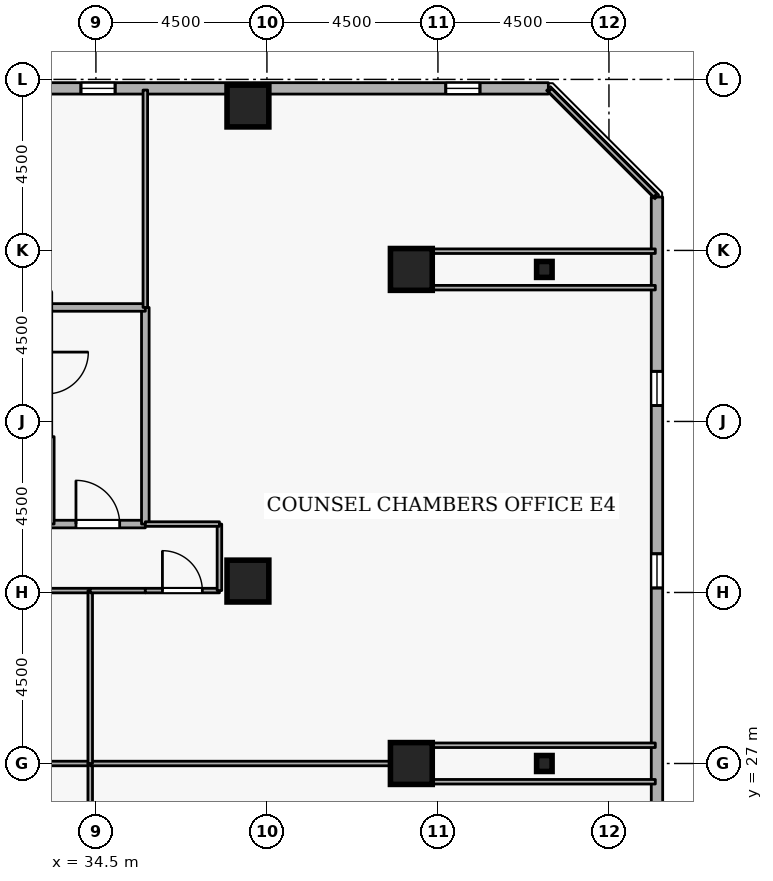
"""IFC4 building model, lengths in metres.
Left out: names, types, materials, properties, quantities, classifications, styles, units other than length and angle.
Written with IfcOpenShell. Run it as: python <this file> out.ifc"""

import sys

from ifc_helpers import new_model, si_unit, direction, frame, frame_2d, origin, origin_2d, place, context, subcontext, project, spatial, rectangle, i_section, extrude, element, fill, save


model = new_model("IFC4")
c1 = context("Model", 3, precision=1e-05, world=origin(), true_north=direction((0.0, 1.0)))
c2 = subcontext(c1, "Body", "Model", "MODEL_VIEW")
j1 = project(units=[si_unit("LENGTHUNIT", "METRE"), si_unit("PLANEANGLEUNIT", "RADIAN")], contexts=[c1])
p1 = place(None, origin())
s1 = spatial("IfcSite", under=j1, at=p1, CompositionType="ELEMENT")
p2 = place(p1, origin())
s2 = spatial("IfcBuilding", under=s1, at=p2, CompositionType="ELEMENT")
p3 = place(p2, frame((0.0, 0.0, 167.1)))
s3 = spatial("IfcBuildingStorey", under=s2, at=p3, CompositionType="ELEMENT", Elevation=167.1)
for number, where, z_axis, x_axis in (
    (1, (42.8, 27.0, 0.0), (0.0, 0.0, 1.0), (1.0, 0.0, 0.0)),
    (2, (42.8, 40.0, 0.0), (0.0, 0.0, 1.0), (1.0, 0.0, 0.0)),
    (3, (38.5, 44.3, 0.0), (0.0, 0.0, 1.0), (1.0, 0.0, 0.0)),
    (4, (38.5, 31.8, 0.0), (0.0, 0.0, 1.0), (1.0, 0.0, 0.0)),
):
    element("IfcColumn", number, at=place(p3, frame(where, z_axis=z_axis, x_axis=x_axis)), inside=s3, PredefinedType="COLUMN", context=c2, shape_type="SweptSolid", body=[
        extrude(rectangle(XDim=1.1, YDim=1.1, at=origin_2d()), origin(), (0.0, 0.0, 1.0), 3.6),
    ])
for number, where, z_axis, x_axis in (
    (5, (46.3, 27.0, 0.0), (0.0, 0.0, 1.0), (1.0, 0.0, 0.0)),
    (6, (46.3, 40.0, 0.0), (0.0, 0.0, 1.0), (1.0, 0.0, 0.0)),
):
    element("IfcColumn", number, at=place(p3, frame(where, z_axis=z_axis, x_axis=x_axis)), inside=s3, PredefinedType="COLUMN", context=c2, shape_type="SweptSolid", body=[
        extrude(i_section(OverallWidth=0.407, OverallDepth=0.419, WebThickness=0.031, FlangeThickness=0.049, FilletRadius=0.015, at=origin_2d()), origin(), (0.0, 0.0, 1.0), 3.6),
    ])
p4 = place(p3, frame((49.265, 5.819, 0.0), z_axis=(0.0, 0.0, 1.0), x_axis=(-2.7061402e-05, 0.999999999634, 0.0)))
e7 = element("IfcWall", 7, at=p4, inside=s3, PredefinedType="STANDARD", context=c2, shape_type="SweptSolid", body=[
    extrude(rectangle(XDim=36.087, YDim=0.3, at=frame_2d((18.043, 0.0))), origin(), (0.0, 0.0, 1.0), 2.7),
])
p5 = place(p4, frame((1.8, 0.0, 0.72)))
e8 = element("IfcOpeningElement", 8, at=p5, cuts=e7, PredefinedType="OPENING", context=c2, shape_type="SweptSolid", body=[
    extrude(rectangle(XDim=0.9, YDim=1.75, at=frame_2d((0.45, 0.875))), frame((0.0, 0.16, 0.0), z_axis=(0.0, -1.0, 0.0), x_axis=(1.0, 0.0, 0.0)), (0.0, 0.0, 1.0), 0.32),
])
p6 = place(p4, frame((11.4, 0.0, 0.72)))
e9 = element("IfcOpeningElement", 9, at=p6, cuts=e7, PredefinedType="OPENING", context=c2, shape_type="SweptSolid", body=[
    extrude(rectangle(XDim=0.9, YDim=1.75, at=frame_2d((0.45, 0.875))), frame((0.0, 0.16, 0.0), z_axis=(0.0, -1.0, 0.0), x_axis=(1.0, 0.0, 0.0)), (0.0, 0.0, 1.0), 0.32),
])
p7 = place(p4, frame((16.2, 0.0, 0.72)))
e10 = element("IfcOpeningElement", 10, at=p7, cuts=e7, PredefinedType="OPENING", context=c2, shape_type="SweptSolid", body=[
    extrude(rectangle(XDim=0.9, YDim=1.75, at=frame_2d((0.45, 0.875))), frame((0.0, 0.16, 0.0), z_axis=(0.0, -1.0, 0.0), x_axis=(1.0, 0.0, 0.0)), (0.0, 0.0, 1.0), 0.32),
])
p8 = place(p4, frame((25.8, 0.0, 0.72)))
e11 = element("IfcOpeningElement", 11, at=p8, cuts=e7, PredefinedType="OPENING", context=c2, shape_type="SweptSolid", body=[
    extrude(rectangle(XDim=0.9, YDim=1.75, at=frame_2d((0.45, 0.875))), frame((0.0, 0.16, 0.0), z_axis=(0.0, -1.0, 0.0), x_axis=(1.0, 0.0, 0.0)), (0.0, 0.0, 1.0), 0.32),
])
p9 = place(p4, frame((30.6, 0.0, 0.72)))
e12 = element("IfcOpeningElement", 12, at=p9, cuts=e7, PredefinedType="OPENING", context=c2, shape_type="SweptSolid", body=[
    extrude(rectangle(XDim=0.9, YDim=1.75, at=frame_2d((0.45, 0.875))), frame((0.0, 0.16, 0.0), z_axis=(0.0, -1.0, 0.0), x_axis=(1.0, 0.0, 0.0)), (0.0, 0.0, 1.0), 0.32),
])
p10 = place(p3, frame((46.406, 44.764, 0.0), z_axis=(0.0, 0.0, 1.0), x_axis=(-0.999999999634, 2.7061402e-05, 0.0)))
e13 = element("IfcWall", 13, at=p10, inside=s3, PredefinedType="STANDARD", context=c2, shape_type="SweptSolid", body=[
    extrude(rectangle(XDim=36.087, YDim=0.3, at=frame_2d((18.043, 0.0))), origin(), (0.0, 0.0, 1.0), 2.7),
])
p11 = place(p10, frame((1.8, 0.0, 0.72)))
e14 = element("IfcOpeningElement", 14, at=p11, cuts=e13, PredefinedType="OPENING", context=c2, shape_type="SweptSolid", body=[
    extrude(rectangle(XDim=0.9, YDim=1.75, at=frame_2d((0.45, 0.875))), frame((0.0, 0.16, 0.0), z_axis=(0.0, -1.0, 0.0), x_axis=(1.0, 0.0, 0.0)), (0.0, 0.0, 1.0), 0.32),
])
p12 = place(p10, frame((11.4, 0.0, 0.72)))
e15 = element("IfcOpeningElement", 15, at=p12, cuts=e13, PredefinedType="OPENING", context=c2, shape_type="SweptSolid", body=[
    extrude(rectangle(XDim=0.9, YDim=1.75, at=frame_2d((0.45, 0.875))), frame((0.0, 0.16, 0.0), z_axis=(0.0, -1.0, 0.0), x_axis=(1.0, 0.0, 0.0)), (0.0, 0.0, 1.0), 0.32),
])
p13 = place(p10, frame((16.2, 0.0, 0.72)))
e16 = element("IfcOpeningElement", 16, at=p13, cuts=e13, PredefinedType="OPENING", context=c2, shape_type="SweptSolid", body=[
    extrude(rectangle(XDim=0.9, YDim=1.75, at=frame_2d((0.45, 0.875))), frame((0.0, 0.16, 0.0), z_axis=(0.0, -1.0, 0.0), x_axis=(1.0, 0.0, 0.0)), (0.0, 0.0, 1.0), 0.32),
])
p14 = place(p10, frame((25.8, 0.0, 0.72)))
e17 = element("IfcOpeningElement", 17, at=p14, cuts=e13, PredefinedType="OPENING", context=c2, shape_type="SweptSolid", body=[
    extrude(rectangle(XDim=0.9, YDim=1.75, at=frame_2d((0.45, 0.875))), frame((0.0, 0.16, 0.0), z_axis=(0.0, -1.0, 0.0), x_axis=(1.0, 0.0, 0.0)), (0.0, 0.0, 1.0), 0.32),
])
p15 = place(p10, frame((30.6, 0.0, 0.72)))
e18 = element("IfcOpeningElement", 18, at=p15, cuts=e13, PredefinedType="OPENING", context=c2, shape_type="SweptSolid", body=[
    extrude(rectangle(XDim=0.9, YDim=1.75, at=frame_2d((0.45, 0.875))), frame((0.0, 0.16, 0.0), z_axis=(0.0, -1.0, 0.0), x_axis=(1.0, 0.0, 0.0)), (0.0, 0.0, 1.0), 0.32),
])
p16 = place(p3, frame((33.3, 33.3, 0.0), z_axis=(0.0, 0.0, 1.0), x_axis=(1.0, 0.0, 0.0)))
e19 = element("IfcWall", 19, at=p16, inside=s3, PredefinedType="STANDARD", context=c2, shape_type="SweptSolid", body=[
    extrude(rectangle(XDim=2.5, YDim=0.2, at=frame_2d((1.25, 0.0))), origin(), (0.0, 0.0, 1.0), 3.34),
])
p17 = place(p16, frame((0.675, 0.0, 0.0)))
e20 = element("IfcOpeningElement", 20, at=p17, cuts=e19, PredefinedType="OPENING", context=c2, shape_type="SweptSolid", body=[
    extrude(rectangle(XDim=1.15, YDim=2.1, at=frame_2d((0.575, 1.05))), frame((0.0, 0.11, 0.0), z_axis=(0.0, -1.0, 0.0), x_axis=(1.0, 0.0, 0.0)), (0.0, 0.0, 1.0), 0.22),
])
p18 = place(p3, frame((35.8, 33.3, 0.0), z_axis=(0.0, 0.0, 1.0), x_axis=(0.0, 1.0, 0.0)))
e21 = element("IfcWall", 21, at=p18, inside=s3, PredefinedType="STANDARD", context=c2, shape_type="SweptSolid", body=[
    extrude(rectangle(XDim=5.7, YDim=0.2, at=frame_2d((2.85, 0.0))), origin(), (0.0, 0.0, 1.0), 3.34),
])
p19 = place(p3, frame((35.8, 39.0, 0.0), z_axis=(0.0, 0.0, 1.0), x_axis=(-1.0, 0.0, 0.0)))
e22 = element("IfcWall", 22, at=p19, inside=s3, PredefinedType="STANDARD", context=c2, shape_type="SweptSolid", body=[
    extrude(rectangle(XDim=2.5, YDim=0.2, at=frame_2d((1.25, 0.0))), origin(), (0.0, 0.0, 1.0), 3.34),
])
p20 = place(p3, frame((33.3, 35.6, 0.0), z_axis=(0.0, 0.0, 1.0), x_axis=(0.0, -1.0, 0.0)))
e23 = element("IfcWall", 23, at=p20, inside=s3, PredefinedType="STANDARD", context=c2, shape_type="SweptSolid", body=[
    extrude(rectangle(XDim=2.3, YDim=0.2, at=frame_2d((1.15, 0.0))), origin(), (0.0, 0.0, 1.0), 2.545),
])
p21 = place(p3, frame((32.45, 27.0, 0.0), z_axis=(0.0, 0.0, 1.0), x_axis=(1.0, 0.0, 0.0)))
e24 = element("IfcWall", 24, at=p21, inside=s3, PredefinedType="PARTITIONING", context=c2, shape_type="SweptSolid", body=[
    extrude(rectangle(XDim=1.9, YDim=0.12, at=frame_2d((0.95, 0.0))), origin(), (0.0, 0.0, 1.0), 3.34),
])
p22 = place(p3, frame((34.35, 27.0, 0.0), z_axis=(0.0, 0.0, 1.0), x_axis=(0.0, -1.0, 0.0)))
e25 = element("IfcWall", 25, at=p22, inside=s3, PredefinedType="PARTITIONING", context=c2, shape_type="SweptSolid", body=[
    extrude(rectangle(XDim=4.55, YDim=0.12, at=frame_2d((2.275, 0.0))), origin(), (0.0, 0.0, 1.0), 3.34),
])
p23 = place(p3, frame((34.35, 27.0, 0.0), z_axis=(0.0, 0.0, 1.0), x_axis=(1.0, 0.0, 0.0)))
e26 = element("IfcWall", 26, at=p23, inside=s3, PredefinedType="PARTITIONING", context=c2, shape_type="SweptSolid", body=[
    extrude(rectangle(XDim=8.45, YDim=0.12, at=frame_2d((4.225, 0.0))), origin(), (0.0, 0.0, 1.0), 2.882),
])
p24 = place(p3, frame((42.8, 26.52, 0.0), z_axis=(0.0, 0.0, 1.0), x_axis=(1.0, 0.0, 0.0)))
e27 = element("IfcWall", 27, at=p24, inside=s3, PredefinedType="PARTITIONING", context=c2, shape_type="SweptSolid", body=[
    extrude(rectangle(XDim=6.42, YDim=0.12, at=frame_2d((3.21, 0.0))), origin(), (0.0, 0.0, 1.0), 3.34),
])
p25 = place(p3, frame((32.45, 31.55, 0.0), z_axis=(0.0, 0.0, 1.0), x_axis=(1.0, 0.0, 0.0)))
e28 = element("IfcWall", 28, at=p25, inside=s3, PredefinedType="PARTITIONING", context=c2, shape_type="SweptSolid", body=[
    extrude(rectangle(XDim=1.9, YDim=0.12, at=frame_2d((0.95, 0.0))), origin(), (0.0, 0.0, 1.0), 3.34),
])
p26 = place(p3, frame((34.35, 31.55, 0.0), z_axis=(0.0, 0.0, 1.0), x_axis=(0.0, -1.0, 0.0)))
e29 = element("IfcWall", 29, at=p26, inside=s3, PredefinedType="PARTITIONING", context=c2, shape_type="SweptSolid", body=[
    extrude(rectangle(XDim=4.55, YDim=0.12, at=frame_2d((2.275, 0.0))), origin(), (0.0, 0.0, 1.0), 3.34),
])
p27 = place(p3, frame((34.35, 31.55, 0.0), z_axis=(0.0, 0.0, 1.0), x_axis=(1.0, 0.0, 0.0)))
e30 = element("IfcWall", 30, at=p27, inside=s3, PredefinedType="PARTITIONING", context=c2, shape_type="SweptSolid", body=[
    extrude(rectangle(XDim=1.45, YDim=0.12, at=frame_2d((0.725, 0.0))), origin(), (0.0, 0.0, 1.0), 3.34),
])
p28 = place(p3, frame((35.8, 31.55, 0.0), z_axis=(0.0, 0.0, 1.0), x_axis=(1.0, 0.0, 0.0)))
e31 = element("IfcWall", 31, at=p28, inside=s3, PredefinedType="PARTITIONING", context=c2, shape_type="SweptSolid", body=[
    extrude(rectangle(XDim=1.95, YDim=0.12, at=frame_2d((0.975, 0.0))), origin(), (0.0, 0.0, 1.0), 3.34),
])
p29 = place(p28, frame((0.45, 0.0, 0.0)))
e32 = element("IfcOpeningElement", 32, at=p29, cuts=e31, PredefinedType="OPENING", context=c2, shape_type="SweptSolid", body=[
    extrude(rectangle(XDim=1.05, YDim=2.1, at=frame_2d((0.525, 1.05))), frame((0.0, 0.07, 0.0), z_axis=(0.0, -1.0, 0.0), x_axis=(1.0, 0.0, 0.0)), (0.0, 0.0, 1.0), 0.14),
])
p30 = place(p3, frame((37.75, 31.55, 0.0), z_axis=(0.0, 0.0, 1.0), x_axis=(0.0, 1.0, 0.0)))
e33 = element("IfcWall", 33, at=p30, inside=s3, PredefinedType="PARTITIONING", context=c2, shape_type="SweptSolid", body=[
    extrude(rectangle(XDim=1.75, YDim=0.12, at=frame_2d((0.875, 0.0))), origin(), (0.0, 0.0, 1.0), 3.34),
])
p31 = place(p3, frame((37.75, 33.3, 0.0), z_axis=(0.0, 0.0, 1.0), x_axis=(-1.0, 0.0, 0.0)))
e34 = element("IfcWall", 34, at=p31, inside=s3, PredefinedType="PARTITIONING", context=c2, shape_type="SweptSolid", body=[
    extrude(rectangle(XDim=1.95, YDim=0.12, at=frame_2d((0.975, 0.0))), origin(), (0.0, 0.0, 1.0), 3.34),
])
p32 = place(p3, frame((35.8, 39.0, 0.0), z_axis=(0.0, 0.0, 1.0), x_axis=(0.0, 1.0, 0.0)))
e35 = element("IfcWall", 35, at=p32, inside=s3, PredefinedType="PARTITIONING", context=c2, shape_type="SweptSolid", body=[
    extrude(rectangle(XDim=5.72, YDim=0.12, at=frame_2d((2.86, 0.0))), origin(), (0.0, 0.0, 1.0), 3.34),
])
p33 = place(p3, frame((46.448, 44.72, 0.0), z_axis=(0.0, 0.0, 1.0), x_axis=(0.707106781187, -0.707106781187, 0.0)))
e36 = element("IfcWall", 36, at=p33, inside=s3, PredefinedType="PARTITIONING", context=c2, shape_type="SweptSolid", body=[
    extrude(rectangle(XDim=3.919, YDim=0.12, at=frame_2d((1.96, 0.0))), origin(), (0.0, 0.0, 1.0), 3.34),
])
p34 = place(p3, frame((49.22, 40.48, 0.0), z_axis=(0.0, 0.0, 1.0), x_axis=(-1.0, 0.0, 0.0)))
e37 = element("IfcWall", 37, at=p34, inside=s3, PredefinedType="PARTITIONING", context=c2, shape_type="SweptSolid", body=[
    extrude(rectangle(XDim=6.42, YDim=0.12, at=frame_2d((3.21, 0.0))), origin(), (0.0, 0.0, 1.0), 2.895),
])
for number, where, z_axis, x_axis in (
    (38, (42.8, 39.52, 0.0), (0.0, 0.0, 1.0), (1.0, 0.0, 0.0)),
    (39, (49.22, 27.48, 0.0), (0.0, 0.0, 1.0), (-1.0, 0.0, 0.0)),
):
    element("IfcWall", number, at=place(p3, frame(where, z_axis=z_axis, x_axis=x_axis)), inside=s3, PredefinedType="PARTITIONING", context=c2, shape_type="SweptSolid", body=[
        extrude(rectangle(XDim=6.42, YDim=0.12, at=frame_2d((3.21, 0.0))), origin(), (0.0, 0.0, 1.0), 3.34),
    ])
p35 = place(p8, origin())
e40 = element("IfcWindow", 40, at=p35, inside=s3, PartitioningType="SINGLE_PANEL", PredefinedType="WINDOW", context=c2, shape_type="SweptSolid", body=[
    extrude(rectangle(XDim=0.9, YDim=1.75, at=frame_2d((0.45, 0.875))), frame((0.0, 0.03, 0.0), z_axis=(0.0, -1.0, 0.0), x_axis=(1.0, 0.0, 0.0)), (0.0, 0.0, 1.0), 0.06),
])
fill(e11, e40)
p36 = place(p9, origin())
e41 = element("IfcWindow", 41, at=p36, inside=s3, PartitioningType="SINGLE_PANEL", PredefinedType="WINDOW", context=c2, shape_type="SweptSolid", body=[
    extrude(rectangle(XDim=0.9, YDim=1.75, at=frame_2d((0.45, 0.875))), frame((0.0, 0.03, 0.0), z_axis=(0.0, -1.0, 0.0), x_axis=(1.0, 0.0, 0.0)), (0.0, 0.0, 1.0), 0.06),
])
fill(e12, e41)
p37 = place(p11, origin())
e42 = element("IfcWindow", 42, at=p37, inside=s3, PartitioningType="SINGLE_PANEL", PredefinedType="WINDOW", context=c2, shape_type="SweptSolid", body=[
    extrude(rectangle(XDim=0.9, YDim=1.75, at=frame_2d((0.45, 0.875))), frame((0.0, 0.03, 0.0), z_axis=(0.0, -1.0, 0.0), x_axis=(1.0, 0.0, 0.0)), (0.0, 0.0, 1.0), 0.06),
])
fill(e14, e42)
p38 = place(p12, origin())
e43 = element("IfcWindow", 43, at=p38, inside=s3, PartitioningType="SINGLE_PANEL", PredefinedType="WINDOW", context=c2, shape_type="SweptSolid", body=[
    extrude(rectangle(XDim=0.9, YDim=1.75, at=frame_2d((0.45, 0.875))), frame((0.0, 0.03, 0.0), z_axis=(0.0, -1.0, 0.0), x_axis=(1.0, 0.0, 0.0)), (0.0, 0.0, 1.0), 0.06),
])
fill(e15, e43)
p39 = place(p17, origin())
e44 = element("IfcDoor", 44, at=p39, inside=s3, OperationType="SINGLE_SWING_LEFT", PredefinedType="DOOR", context=c2, shape_type="SweptSolid", body=[
    extrude(rectangle(XDim=1.15, YDim=2.1, at=frame_2d((0.575, 1.05))), frame((0.0, 0.025, 0.0), z_axis=(0.0, -1.0, 0.0), x_axis=(1.0, 0.0, 0.0)), (0.0, 0.0, 1.0), 0.05),
])
fill(e20, e44)
p40 = place(p29, origin())
e45 = element("IfcDoor", 45, at=p40, inside=s3, OperationType="SINGLE_SWING_LEFT", PredefinedType="DOOR", context=c2, shape_type="SweptSolid", body=[
    extrude(rectangle(XDim=1.05, YDim=2.1, at=frame_2d((0.525, 1.05))), frame((0.0, 0.025, 0.0), z_axis=(0.0, -1.0, 0.0), x_axis=(1.0, 0.0, 0.0)), (0.0, 0.0, 1.0), 0.05),
])
fill(e32, e45)
save(model, sys.argv[1])
